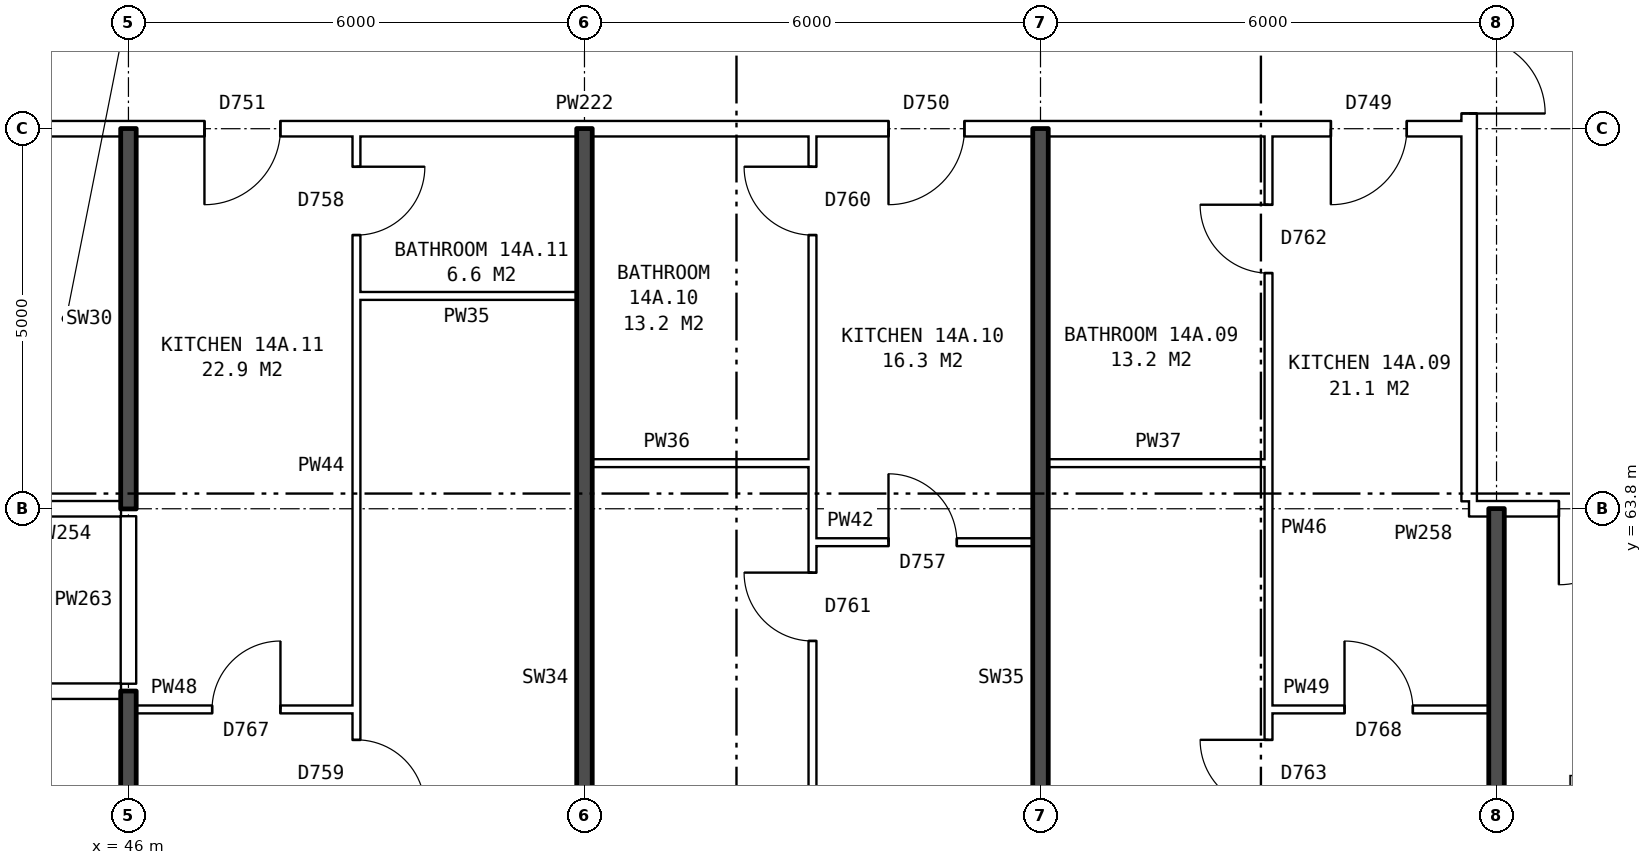
"""IFC4 building model, lengths in metres.
Left out: names, types, materials, properties, quantities, classifications, styles, units other than length and angle.
Written with IfcOpenShell. Run it as: python <this file> out.ifc"""

import sys

from ifc_helpers import new_model, si_unit, direction, frame, frame_2d, origin, place, context, subcontext, project, spatial, rectangle, extrude, element, fill, save


model = new_model("IFC4")
c1 = context("Model", 3, precision=1e-05, world=origin(), true_north=direction((0.0, 1.0)))
c2 = subcontext(c1, "Body", "Model", "MODEL_VIEW")
j1 = project(units=[si_unit("LENGTHUNIT", "METRE"), si_unit("PLANEANGLEUNIT", "RADIAN")], contexts=[c1])
p1 = place(None, origin())
s1 = spatial("IfcSite", under=j1, at=p1, CompositionType="ELEMENT")
p2 = place(p1, origin())
s2 = spatial("IfcBuilding", under=s1, at=p2, CompositionType="ELEMENT")
p3 = place(p2, frame((0.0, 0.0, 53.6)))
s3 = spatial("IfcBuildingStorey", under=s2, at=p3, CompositionType="ELEMENT", Elevation=53.6)
p4 = place(p3, frame((63.64, 63.9, 0.0), z_axis=(0.0, 0.0, 1.0), x_axis=(0.0, 1.0, 0.0)))
e1 = element("IfcWall", 1, at=p4, inside=s3, PredefinedType="PARTITIONING", context=c2, shape_type="SweptSolid", body=[
    extrude(rectangle(XDim=12.2, YDim=0.2, at=frame_2d((6.1, 0.0))), origin(), (0.0, 0.0, 1.0), 2.85),
])
p5 = place(p4, frame((5.1, 0.0, 0.0)))
e2 = element("IfcOpeningElement", 2, at=p5, cuts=e1, PredefinedType="OPENING", context=c2, shape_type="SweptSolid", body=[
    extrude(rectangle(XDim=2.0, YDim=2.1, at=frame_2d((1.0, 1.05))), frame((0.0, 0.11, 0.0), z_axis=(0.0, -1.0, 0.0), x_axis=(1.0, 0.0, 0.0)), (0.0, 0.0, 1.0), 0.22),
])
p6 = place(p3, frame((46.1, 61.16, 0.0), z_axis=(0.0, 0.0, 1.0), x_axis=(1.0, 0.0, 0.0)))
e3 = element("IfcWall", 3, at=p6, inside=s3, PredefinedType="PARTITIONING", context=c2, shape_type="SweptSolid", body=[
    extrude(rectangle(XDim=2.9, YDim=0.1, at=frame_2d((1.45, 0.0))), origin(), (0.0, 0.0, 1.0), 2.85),
])
p7 = place(p6, frame((1.0, 0.0, 0.0)))
e4 = element("IfcOpeningElement", 4, at=p7, cuts=e3, PredefinedType="OPENING", context=c2, shape_type="SweptSolid", body=[
    extrude(rectangle(XDim=0.9, YDim=2.1, at=frame_2d((0.45, 1.05))), frame((0.0, 0.06, 0.0), z_axis=(0.0, -1.0, 0.0), x_axis=(1.0, 0.0, 0.0)), (0.0, 0.0, 1.0), 0.12),
])
p8 = place(p3, frame((61.0, 61.16, 0.0), z_axis=(0.0, 0.0, 1.0), x_axis=(1.0, 0.0, 0.0)))
e5 = element("IfcWall", 5, at=p8, inside=s3, PredefinedType="PARTITIONING", context=c2, shape_type="SweptSolid", body=[
    extrude(rectangle(XDim=2.9, YDim=0.1, at=frame_2d((1.45, 0.0))), origin(), (0.0, 0.0, 1.0), 2.85),
])
p9 = place(p8, frame((1.0, 0.0, 0.0)))
e6 = element("IfcOpeningElement", 6, at=p9, cuts=e5, PredefinedType="OPENING", context=c2, shape_type="SweptSolid", body=[
    extrude(rectangle(XDim=0.9, YDim=2.1, at=frame_2d((0.45, 1.05))), frame((0.0, 0.06, 0.0), z_axis=(0.0, -1.0, 0.0), x_axis=(1.0, 0.0, 0.0)), (0.0, 0.0, 1.0), 0.12),
])
p10 = place(p3, frame((21.86, 61.4, 0.0), z_axis=(0.0, 0.0, 1.0), x_axis=(1.0, 0.0, 0.0)))
e7 = element("IfcWall", 7, at=p10, inside=s3, PredefinedType="PARTITIONING", context=c2, shape_type="SweptSolid", body=[
    extrude(rectangle(XDim=24.04, YDim=0.2, at=frame_2d((12.02, 0.0))), origin(), (0.0, 0.0, 1.0), 2.85),
])
p11 = place(p10, frame((19.44, 0.0, 0.0)))
e8 = element("IfcOpeningElement", 8, at=p11, cuts=e7, PredefinedType="OPENING", context=c2, shape_type="SweptSolid", body=[
    extrude(rectangle(XDim=1.0, YDim=2.1, at=frame_2d((0.5, 1.05))), frame((0.0, 0.11, 0.0), z_axis=(0.0, -1.0, 0.0), x_axis=(1.0, 0.0, 0.0)), (0.0, 0.0, 1.0), 0.22),
])
p12 = place(p10, frame((14.64, 0.0, 0.0)))
e9 = element("IfcOpeningElement", 9, at=p12, cuts=e7, PredefinedType="OPENING", context=c2, shape_type="SweptSolid", body=[
    extrude(rectangle(XDim=1.0, YDim=2.1, at=frame_2d((0.5, 1.05))), frame((0.0, 0.11, 0.0), z_axis=(0.0, -1.0, 0.0), x_axis=(1.0, 0.0, 0.0)), (0.0, 0.0, 1.0), 0.22),
])
p13 = place(p10, frame((2.57, 0.0, 0.0)))
e10 = element("IfcOpeningElement", 10, at=p13, cuts=e7, PredefinedType="OPENING", context=c2, shape_type="SweptSolid", body=[
    extrude(rectangle(XDim=1.0, YDim=2.1, at=frame_2d((0.5, 1.05))), frame((0.0, 0.11, 0.0), z_axis=(0.0, -1.0, 0.0), x_axis=(1.0, 0.0, 0.0)), (0.0, 0.0, 1.0), 0.22),
])
p14 = place(p3, frame((55.0, 63.36, 0.0), z_axis=(0.0, 0.0, 1.0), x_axis=(1.0, 0.0, 0.0)))
e11 = element("IfcWall", 11, at=p14, inside=s3, PredefinedType="PARTITIONING", context=c2, shape_type="SweptSolid", body=[
    extrude(rectangle(XDim=2.9, YDim=0.1, at=frame_2d((1.45, 0.0))), origin(), (0.0, 0.0, 1.0), 2.85),
])
p15 = place(p14, frame((1.0, 0.0, 0.0)))
e12 = element("IfcOpeningElement", 12, at=p15, cuts=e11, PredefinedType="OPENING", context=c2, shape_type="SweptSolid", body=[
    extrude(rectangle(XDim=0.9, YDim=2.1, at=frame_2d((0.45, 1.05))), frame((0.0, 0.06, 0.0), z_axis=(0.0, -1.0, 0.0), x_axis=(1.0, 0.0, 0.0)), (0.0, 0.0, 1.0), 0.12),
])
p16 = place(p3, frame((44.36, 63.8, 0.0), z_axis=(0.0, 0.0, 1.0), x_axis=(1.0, 0.0, 0.0)))
e13 = element("IfcWall", 13, at=p16, inside=s3, PredefinedType="PARTITIONING", context=c2, shape_type="SweptSolid", body=[
    extrude(rectangle(XDim=1.54, YDim=0.2, at=frame_2d((0.77, 0.0))), origin(), (0.0, 0.0, 1.0), 2.85),
])
p17 = place(p3, frame((63.64, 63.8, 0.0), z_axis=(0.0, 0.0, 1.0), x_axis=(1.0, 0.0, 0.0)))
e14 = element("IfcWall", 14, at=p17, inside=s3, PredefinedType="PARTITIONING", context=c2, shape_type="SweptSolid", body=[
    extrude(rectangle(XDim=3.0, YDim=0.2, at=frame_2d((1.5, 0.0))), origin(), (0.0, 0.0, 1.0), 2.85),
])
p18 = place(p17, frame((1.18, 0.0, 0.0)))
e15 = element("IfcOpeningElement", 15, at=p18, cuts=e14, PredefinedType="OPENING", context=c2, shape_type="SweptSolid", body=[
    extrude(rectangle(XDim=1.0, YDim=2.1, at=frame_2d((0.5, 1.05))), frame((0.0, 0.11, 0.0), z_axis=(0.0, -1.0, 0.0), x_axis=(1.0, 0.0, 0.0)), (0.0, 0.0, 1.0), 0.22),
])
for number, where, z_axis, x_axis in (
    (16, (52.1, 64.4, 0.0), (0.0, 0.0, 1.0), (1.0, 0.0, 0.0)),
    (17, (58.1, 64.4, 0.0), (0.0, 0.0, 1.0), (1.0, 0.0, 0.0)),
    (18, (49.0, 66.6, 0.0), (0.0, 0.0, 1.0), (1.0, 0.0, 0.0)),
):
    element("IfcWall", number, at=place(p3, frame(where, z_axis=z_axis, x_axis=x_axis)), inside=s3, PredefinedType="PARTITIONING", context=c2, shape_type="SweptSolid", body=[
        extrude(rectangle(XDim=2.9, YDim=0.1, at=frame_2d((1.45, 0.0))), origin(), (0.0, 0.0, 1.0), 2.85),
    ])
p19 = place(p3, frame((44.36, 68.8, 0.0), z_axis=(0.0, 0.0, 1.0), x_axis=(1.0, 0.0, 0.0)))
e19 = element("IfcWall", 19, at=p19, inside=s3, PredefinedType="PARTITIONING", context=c2, shape_type="SweptSolid", body=[
    extrude(rectangle(XDim=19.28, YDim=0.2, at=frame_2d((9.64, 0.0))), origin(), (0.0, 0.0, 1.0), 2.85),
])
p20 = place(p19, frame((17.46, 0.0, 0.0)))
e20 = element("IfcOpeningElement", 20, at=p20, cuts=e19, PredefinedType="OPENING", context=c2, shape_type="SweptSolid", body=[
    extrude(rectangle(XDim=1.0, YDim=2.1, at=frame_2d((0.5, 1.05))), frame((0.0, 0.11, 0.0), z_axis=(0.0, -1.0, 0.0), x_axis=(1.0, 0.0, 0.0)), (0.0, 0.0, 1.0), 0.22),
])
p21 = place(p19, frame((11.64, 0.0, 0.0)))
e21 = element("IfcOpeningElement", 21, at=p21, cuts=e19, PredefinedType="OPENING", context=c2, shape_type="SweptSolid", body=[
    extrude(rectangle(XDim=1.0, YDim=2.1, at=frame_2d((0.5, 1.05))), frame((0.0, 0.11, 0.0), z_axis=(0.0, -1.0, 0.0), x_axis=(1.0, 0.0, 0.0)), (0.0, 0.0, 1.0), 0.22),
])
p22 = place(p19, frame((2.64, 0.0, 0.0)))
e22 = element("IfcOpeningElement", 22, at=p22, cuts=e19, PredefinedType="OPENING", context=c2, shape_type="SweptSolid", body=[
    extrude(rectangle(XDim=1.0, YDim=2.1, at=frame_2d((0.5, 1.05))), frame((0.0, 0.11, 0.0), z_axis=(0.0, -1.0, 0.0), x_axis=(1.0, 0.0, 0.0)), (0.0, 0.0, 1.0), 0.22),
])
p23 = place(p3, frame((46.0, 54.36, 0.0), z_axis=(0.0, 0.0, 1.0), x_axis=(0.0, 1.0, 0.0)))
e23 = element("IfcWall", 23, at=p23, inside=s3, PredefinedType="SOLIDWALL", context=c2, shape_type="SweptSolid", body=[
    extrude(rectangle(XDim=7.04, YDim=0.2, at=frame_2d((3.52, 0.0))), origin(), (0.0, 0.0, 1.0), 2.85),
])
p24 = place(p3, frame((46.0, 61.5, 0.0), z_axis=(0.0, 0.0, 1.0), x_axis=(0.0, 1.0, 0.0)))
e24 = element("IfcWall", 24, at=p24, inside=s3, PredefinedType="PARTITIONING", context=c2, shape_type="SweptSolid", body=[
    extrude(rectangle(XDim=2.2, YDim=0.2, at=frame_2d((1.1, 0.0))), origin(), (0.0, 0.0, 1.0), 2.85),
])
p25 = place(p3, frame((46.0, 63.8, 0.0), z_axis=(0.0, 0.0, 1.0), x_axis=(0.0, 1.0, 0.0)))
e25 = element("IfcWall", 25, at=p25, inside=s3, PredefinedType="SOLIDWALL", context=c2, shape_type="SweptSolid", body=[
    extrude(rectangle(XDim=5.0, YDim=0.2, at=frame_2d((2.5, 0.0))), origin(), (0.0, 0.0, 1.0), 2.85),
])
p26 = place(p3, frame((49.0, 54.36, 0.0), z_axis=(0.0, 0.0, 1.0), x_axis=(0.0, 1.0, 0.0)))
e26 = element("IfcWall", 26, at=p26, inside=s3, PredefinedType="PARTITIONING", context=c2, shape_type="SweptSolid", body=[
    extrude(rectangle(XDim=14.34, YDim=0.1, at=frame_2d((7.17, 0.0))), origin(), (0.0, 0.0, 1.0), 2.85),
])
p27 = place(p26, frame((5.5, 0.0, 0.0)))
e27 = element("IfcOpeningElement", 27, at=p27, cuts=e26, PredefinedType="OPENING", context=c2, shape_type="SweptSolid", body=[
    extrude(rectangle(XDim=0.9, YDim=2.1, at=frame_2d((0.45, 1.05))), frame((0.0, 0.06, 0.0), z_axis=(0.0, -1.0, 0.0), x_axis=(1.0, 0.0, 0.0)), (0.0, 0.0, 1.0), 0.12),
])
p28 = place(p26, frame((13.04, 0.0, 0.0)))
e28 = element("IfcOpeningElement", 28, at=p28, cuts=e26, PredefinedType="OPENING", context=c2, shape_type="SweptSolid", body=[
    extrude(rectangle(XDim=0.9, YDim=2.1, at=frame_2d((0.45, 1.05))), frame((0.0, 0.06, 0.0), z_axis=(0.0, -1.0, 0.0), x_axis=(1.0, 0.0, 0.0)), (0.0, 0.0, 1.0), 0.12),
])
p29 = place(p3, frame((52.0, 54.36, 0.0), z_axis=(0.0, 0.0, 1.0), x_axis=(0.0, 1.0, 0.0)))
e29 = element("IfcWall", 29, at=p29, inside=s3, PredefinedType="SOLIDWALL", context=c2, shape_type="SweptSolid", body=[
    extrude(rectangle(XDim=14.44, YDim=0.2, at=frame_2d((7.22, 0.0))), origin(), (0.0, 0.0, 1.0), 2.85),
])
p30 = place(p3, frame((55.0, 54.36, 0.0), z_axis=(0.0, 0.0, 1.0), x_axis=(0.0, 1.0, 0.0)))
e30 = element("IfcWall", 30, at=p30, inside=s3, PredefinedType="PARTITIONING", context=c2, shape_type="SweptSolid", body=[
    extrude(rectangle(XDim=14.34, YDim=0.1, at=frame_2d((7.17, 0.0))), origin(), (0.0, 0.0, 1.0), 2.85),
])
p31 = place(p30, frame((7.7, 0.0, 0.0)))
e31 = element("IfcOpeningElement", 31, at=p31, cuts=e30, PredefinedType="OPENING", context=c2, shape_type="SweptSolid", body=[
    extrude(rectangle(XDim=0.9, YDim=2.1, at=frame_2d((0.45, 1.05))), frame((0.0, 0.06, 0.0), z_axis=(0.0, -1.0, 0.0), x_axis=(1.0, 0.0, 0.0)), (0.0, 0.0, 1.0), 0.12),
])
p32 = place(p30, frame((13.04, 0.0, 0.0)))
e32 = element("IfcOpeningElement", 32, at=p32, cuts=e30, PredefinedType="OPENING", context=c2, shape_type="SweptSolid", body=[
    extrude(rectangle(XDim=0.9, YDim=2.1, at=frame_2d((0.45, 1.05))), frame((0.0, 0.06, 0.0), z_axis=(0.0, -1.0, 0.0), x_axis=(1.0, 0.0, 0.0)), (0.0, 0.0, 1.0), 0.12),
])
p33 = place(p3, frame((58.0, 54.36, 0.0), z_axis=(0.0, 0.0, 1.0), x_axis=(0.0, 1.0, 0.0)))
e33 = element("IfcWall", 33, at=p33, inside=s3, PredefinedType="SOLIDWALL", context=c2, shape_type="SweptSolid", body=[
    extrude(rectangle(XDim=14.44, YDim=0.2, at=frame_2d((7.22, 0.0))), origin(), (0.0, 0.0, 1.0), 2.85),
])
p34 = place(p3, frame((61.0, 54.36, 0.0), z_axis=(0.0, 0.0, 1.0), x_axis=(0.0, 1.0, 0.0)))
e34 = element("IfcWall", 34, at=p34, inside=s3, PredefinedType="PARTITIONING", context=c2, shape_type="SweptSolid", body=[
    extrude(rectangle(XDim=14.34, YDim=0.1, at=frame_2d((7.17, 0.0))), origin(), (0.0, 0.0, 1.0), 2.85),
])
p35 = place(p34, frame((5.5, 0.0, 0.0)))
e35 = element("IfcOpeningElement", 35, at=p35, cuts=e34, PredefinedType="OPENING", context=c2, shape_type="SweptSolid", body=[
    extrude(rectangle(XDim=0.9, YDim=2.1, at=frame_2d((0.45, 1.05))), frame((0.0, 0.06, 0.0), z_axis=(0.0, -1.0, 0.0), x_axis=(1.0, 0.0, 0.0)), (0.0, 0.0, 1.0), 0.12),
])
p36 = place(p34, frame((12.54, 0.0, 0.0)))
e36 = element("IfcOpeningElement", 36, at=p36, cuts=e34, PredefinedType="OPENING", context=c2, shape_type="SweptSolid", body=[
    extrude(rectangle(XDim=0.9, YDim=2.1, at=frame_2d((0.45, 1.05))), frame((0.0, 0.06, 0.0), z_axis=(0.0, -1.0, 0.0), x_axis=(1.0, 0.0, 0.0)), (0.0, 0.0, 1.0), 0.12),
])
p37 = place(p3, frame((64.0, 54.36, 0.0), z_axis=(0.0, 0.0, 1.0), x_axis=(0.0, 1.0, 0.0)))
e37 = element("IfcWall", 37, at=p37, inside=s3, PredefinedType="SOLIDWALL", context=c2, shape_type="SweptSolid", body=[
    extrude(rectangle(XDim=9.44, YDim=0.2, at=frame_2d((4.72, 0.0))), origin(), (0.0, 0.0, 1.0), 2.85),
])
p38 = place(p5, frame((2.0, 0.0, 0.0), z_axis=(0.0, 0.0, 1.0), x_axis=(-1.0, 0.0, 0.0)))
e38 = element("IfcDoor", 38, at=p38, inside=s3, OperationType="DOUBLE_DOOR_SINGLE_SWING", PredefinedType="DOOR", context=c2, shape_type="SweptSolid", body=[
    extrude(rectangle(XDim=2.0, YDim=2.1, at=frame_2d((1.0, 1.05))), frame((0.0, 0.025, 0.0), z_axis=(0.0, -1.0, 0.0), x_axis=(1.0, 0.0, 0.0)), (0.0, 0.0, 1.0), 0.05),
])
fill(e2, e38)
p39 = place(p18, frame((1.0, 0.0, 0.0), z_axis=(0.0, 0.0, 1.0), x_axis=(-1.0, 0.0, 0.0)))
e39 = element("IfcDoor", 39, at=p39, inside=s3, OperationType="SINGLE_SWING_RIGHT", PredefinedType="DOOR", context=c2, shape_type="SweptSolid", body=[
    extrude(rectangle(XDim=1.0, YDim=2.1, at=frame_2d((0.5, 1.05))), frame((0.0, 0.025, 0.0), z_axis=(0.0, -1.0, 0.0), x_axis=(1.0, 0.0, 0.0)), (0.0, 0.0, 1.0), 0.05),
])
fill(e15, e39)
p40 = place(p35, origin())
e40 = element("IfcDoor", 40, at=p40, inside=s3, OperationType="SINGLE_SWING_RIGHT", PredefinedType="DOOR", context=c2, shape_type="SweptSolid", body=[
    extrude(rectangle(XDim=0.9, YDim=2.1, at=frame_2d((0.45, 1.05))), frame((0.0, 0.025, 0.0), z_axis=(0.0, -1.0, 0.0), x_axis=(1.0, 0.0, 0.0)), (0.0, 0.0, 1.0), 0.05),
])
fill(e35, e40)
p41 = place(p20, frame((1.0, 0.0, 0.0), z_axis=(0.0, 0.0, 1.0), x_axis=(-1.0, 0.0, 0.0)))
e41 = element("IfcDoor", 41, at=p41, inside=s3, OperationType="SINGLE_SWING_RIGHT", PredefinedType="DOOR", context=c2, shape_type="SweptSolid", body=[
    extrude(rectangle(XDim=1.0, YDim=2.1, at=frame_2d((0.5, 1.05))), frame((0.0, 0.025, 0.0), z_axis=(0.0, -1.0, 0.0), x_axis=(1.0, 0.0, 0.0)), (0.0, 0.0, 1.0), 0.05),
])
fill(e20, e41)
p42 = place(p9, origin())
e42 = element("IfcDoor", 42, at=p42, inside=s3, OperationType="SINGLE_SWING_LEFT", PredefinedType="DOOR", context=c2, shape_type="SweptSolid", body=[
    extrude(rectangle(XDim=0.9, YDim=2.1, at=frame_2d((0.45, 1.05))), frame((0.0, 0.025, 0.0), z_axis=(0.0, -1.0, 0.0), x_axis=(1.0, 0.0, 0.0)), (0.0, 0.0, 1.0), 0.05),
])
fill(e6, e42)
p43 = place(p36, origin())
e43 = element("IfcDoor", 43, at=p43, inside=s3, OperationType="SINGLE_SWING_RIGHT", PredefinedType="DOOR", context=c2, shape_type="SweptSolid", body=[
    extrude(rectangle(XDim=0.9, YDim=2.1, at=frame_2d((0.45, 1.05))), frame((0.0, 0.025, 0.0), z_axis=(0.0, -1.0, 0.0), x_axis=(1.0, 0.0, 0.0)), (0.0, 0.0, 1.0), 0.05),
])
fill(e36, e43)
p44 = place(p31, origin())
e44 = element("IfcDoor", 44, at=p44, inside=s3, OperationType="SINGLE_SWING_RIGHT", PredefinedType="DOOR", context=c2, shape_type="SweptSolid", body=[
    extrude(rectangle(XDim=0.9, YDim=2.1, at=frame_2d((0.45, 1.05))), frame((0.0, 0.025, 0.0), z_axis=(0.0, -1.0, 0.0), x_axis=(1.0, 0.0, 0.0)), (0.0, 0.0, 1.0), 0.05),
])
fill(e31, e44)
p45 = place(p21, frame((1.0, 0.0, 0.0), z_axis=(0.0, 0.0, 1.0), x_axis=(-1.0, 0.0, 0.0)))
e45 = element("IfcDoor", 45, at=p45, inside=s3, OperationType="SINGLE_SWING_RIGHT", PredefinedType="DOOR", context=c2, shape_type="SweptSolid", body=[
    extrude(rectangle(XDim=1.0, YDim=2.1, at=frame_2d((0.5, 1.05))), frame((0.0, 0.025, 0.0), z_axis=(0.0, -1.0, 0.0), x_axis=(1.0, 0.0, 0.0)), (0.0, 0.0, 1.0), 0.05),
])
fill(e21, e45)
p46 = place(p15, origin())
e46 = element("IfcDoor", 46, at=p46, inside=s3, OperationType="SINGLE_SWING_LEFT", PredefinedType="DOOR", context=c2, shape_type="SweptSolid", body=[
    extrude(rectangle(XDim=0.9, YDim=2.1, at=frame_2d((0.45, 1.05))), frame((0.0, 0.025, 0.0), z_axis=(0.0, -1.0, 0.0), x_axis=(1.0, 0.0, 0.0)), (0.0, 0.0, 1.0), 0.05),
])
fill(e12, e46)
p47 = place(p32, origin())
e47 = element("IfcDoor", 47, at=p47, inside=s3, OperationType="SINGLE_SWING_RIGHT", PredefinedType="DOOR", context=c2, shape_type="SweptSolid", body=[
    extrude(rectangle(XDim=0.9, YDim=2.1, at=frame_2d((0.45, 1.05))), frame((0.0, 0.025, 0.0), z_axis=(0.0, -1.0, 0.0), x_axis=(1.0, 0.0, 0.0)), (0.0, 0.0, 1.0), 0.05),
])
fill(e32, e47)
p48 = place(p27, frame((0.9, 0.0, 0.0), z_axis=(0.0, 0.0, 1.0), x_axis=(-1.0, 0.0, 0.0)))
e48 = element("IfcDoor", 48, at=p48, inside=s3, OperationType="SINGLE_SWING_RIGHT", PredefinedType="DOOR", context=c2, shape_type="SweptSolid", body=[
    extrude(rectangle(XDim=0.9, YDim=2.1, at=frame_2d((0.45, 1.05))), frame((0.0, 0.025, 0.0), z_axis=(0.0, -1.0, 0.0), x_axis=(1.0, 0.0, 0.0)), (0.0, 0.0, 1.0), 0.05),
])
fill(e27, e48)
p49 = place(p22, frame((1.0, 0.0, 0.0), z_axis=(0.0, 0.0, 1.0), x_axis=(-1.0, 0.0, 0.0)))
e49 = element("IfcDoor", 49, at=p49, inside=s3, OperationType="SINGLE_SWING_RIGHT", PredefinedType="DOOR", context=c2, shape_type="SweptSolid", body=[
    extrude(rectangle(XDim=1.0, YDim=2.1, at=frame_2d((0.5, 1.05))), frame((0.0, 0.025, 0.0), z_axis=(0.0, -1.0, 0.0), x_axis=(1.0, 0.0, 0.0)), (0.0, 0.0, 1.0), 0.05),
])
fill(e22, e49)
p50 = place(p7, origin())
e50 = element("IfcDoor", 50, at=p50, inside=s3, OperationType="SINGLE_SWING_RIGHT", PredefinedType="DOOR", context=c2, shape_type="SweptSolid", body=[
    extrude(rectangle(XDim=0.9, YDim=2.1, at=frame_2d((0.45, 1.05))), frame((0.0, 0.025, 0.0), z_axis=(0.0, -1.0, 0.0), x_axis=(1.0, 0.0, 0.0)), (0.0, 0.0, 1.0), 0.05),
])
fill(e4, e50)
p51 = place(p28, frame((0.9, 0.0, 0.0), z_axis=(0.0, 0.0, 1.0), x_axis=(-1.0, 0.0, 0.0)))
e51 = element("IfcDoor", 51, at=p51, inside=s3, OperationType="SINGLE_SWING_LEFT", PredefinedType="DOOR", context=c2, shape_type="SweptSolid", body=[
    extrude(rectangle(XDim=0.9, YDim=2.1, at=frame_2d((0.45, 1.05))), frame((0.0, 0.025, 0.0), z_axis=(0.0, -1.0, 0.0), x_axis=(1.0, 0.0, 0.0)), (0.0, 0.0, 1.0), 0.05),
])
fill(e28, e51)
save(model, sys.argv[1])
